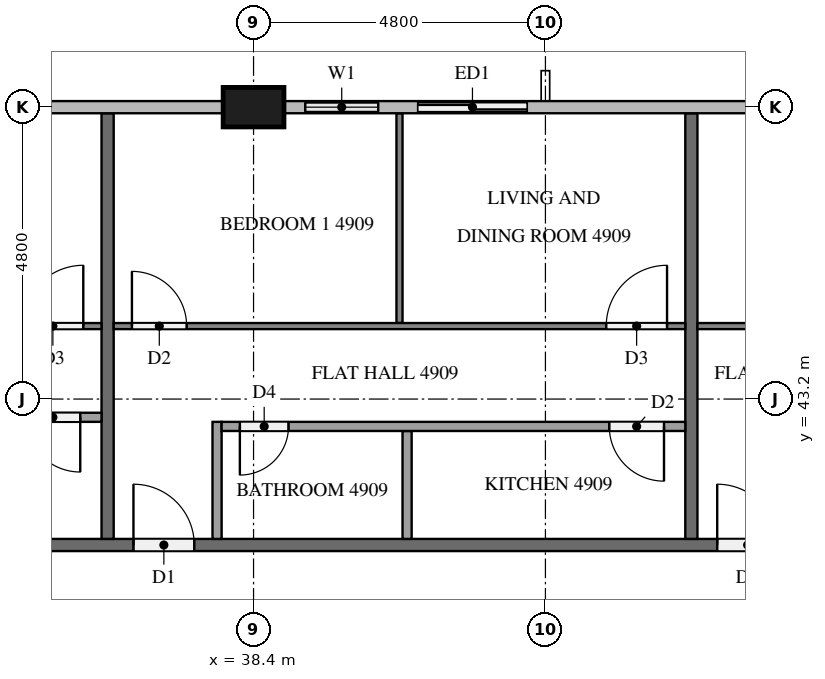
"""IFC4 building model, lengths in metres.
Left out: names, types, materials, properties, quantities, classifications, styles, units other than length and angle.
Written with IfcOpenShell. Run it as: python <this file> out.ifc"""

import sys

from ifc_helpers import new_model, si_unit, direction, frame, frame_2d, origin, origin_2d, place, context, subcontext, project, spatial, rectangle, extrude, element, fill, save


model = new_model("IFC4")
c1 = context("Model", 3, precision=1e-05, world=origin(), true_north=direction((0.0, 1.0)))
c2 = subcontext(c1, "Body", "Model", "MODEL_VIEW")
j1 = project(units=[si_unit("LENGTHUNIT", "METRE"), si_unit("PLANEANGLEUNIT", "RADIAN")], contexts=[c1])
p1 = place(None, origin())
s1 = spatial("IfcSite", under=j1, at=p1, CompositionType="ELEMENT")
p2 = place(p1, origin())
s2 = spatial("IfcBuilding", under=s1, at=p2, CompositionType="ELEMENT")
p3 = place(p2, frame((0.0, 0.0, 189.4)))
s3 = spatial("IfcBuildingStorey", under=s2, at=p3, CompositionType="ELEMENT", Elevation=189.4)
p4 = place(p3, frame((38.4, 48.0, 0.0), z_axis=(0.0, 0.0, 1.0), x_axis=(1.0, 0.0, 0.0)))
e1 = element("IfcColumn", 1, at=p4, inside=s3, PredefinedType="COLUMN", context=c2, shape_type="SweptSolid", body=[
    extrude(rectangle(XDim=1.0, YDim=0.65, at=origin_2d()), origin(), (0.0, 0.0, 1.0), 3.2),
])
p5 = place(p3, frame((43.2, 48.0, 0.0), z_axis=(0.0, 0.0, 1.0), x_axis=(-1.0, 0.0, 0.0)))
e2 = element("IfcWall", 2, at=p5, inside=s3, PredefinedType="SOLIDWALL", context=c2, shape_type="SweptSolid", body=[
    extrude(rectangle(XDim=4.3, YDim=0.15, at=frame_2d((2.15, 0.0))), origin(), (0.0, 0.0, 1.0), 3.2),
])
p6 = place(p5, frame((0.3, 0.0, 0.0)))
e3 = element("IfcOpeningElement", 3, at=p6, cuts=e2, PredefinedType="OPENING", context=c2, shape_type="SweptSolid", body=[
    extrude(rectangle(XDim=1.8, YDim=2.4, at=frame_2d((0.9, 1.2))), frame((0.0, 0.085, 0.0), z_axis=(0.0, -1.0, 0.0), x_axis=(1.0, 0.0, 0.0)), (0.0, 0.0, 1.0), 0.17),
])
p7 = place(p5, frame((2.75, 0.0, 0.9)))
e4 = element("IfcOpeningElement", 4, at=p7, cuts=e2, PredefinedType="OPENING", context=c2, shape_type="SweptSolid", body=[
    extrude(rectangle(XDim=1.2, YDim=1.4, at=frame_2d((0.6, 0.7))), frame((0.0, 0.085, 0.0), z_axis=(0.0, -1.0, 0.0), x_axis=(1.0, 0.0, 0.0)), (0.0, 0.0, 1.0), 0.17),
])
p8 = place(p3, frame((11.9, 40.8, 0.0), z_axis=(0.0, 0.0, 1.0), x_axis=(1.0, 0.0, 0.0)))
e5 = element("IfcWall", 5, at=p8, inside=s3, PredefinedType="PARTITIONING", context=c2, shape_type="SweptSolid", body=[
    extrude(rectangle(XDim=38.6, YDim=0.2, at=frame_2d((19.3, 0.0))), origin(), (0.0, 0.0, 1.0), 3.2),
])
p9 = place(p8, frame((34.125, 0.0, 0.0)))
e6 = element("IfcOpeningElement", 6, at=p9, cuts=e5, PredefinedType="OPENING", context=c2, shape_type="SweptSolid", body=[
    extrude(rectangle(XDim=1.0, YDim=2.1, at=frame_2d((0.5, 1.05))), frame((0.0, 0.11, 0.0), z_axis=(0.0, -1.0, 0.0), x_axis=(1.0, 0.0, 0.0)), (0.0, 0.0, 1.0), 0.22),
])
p10 = place(p8, frame((24.525, 0.0, 0.0)))
e7 = element("IfcOpeningElement", 7, at=p10, cuts=e5, PredefinedType="OPENING", context=c2, shape_type="SweptSolid", body=[
    extrude(rectangle(XDim=1.0, YDim=2.1, at=frame_2d((0.5, 1.05))), frame((0.0, 0.11, 0.0), z_axis=(0.0, -1.0, 0.0), x_axis=(1.0, 0.0, 0.0)), (0.0, 0.0, 1.0), 0.22),
])
p11 = place(p8, frame((7.725, 0.0, 0.0)))
e8 = element("IfcOpeningElement", 8, at=p11, cuts=e5, PredefinedType="OPENING", context=c2, shape_type="SweptSolid", body=[
    extrude(rectangle(XDim=1.0, YDim=2.1, at=frame_2d((0.5, 1.05))), frame((0.0, 0.11, 0.0), z_axis=(0.0, -1.0, 0.0), x_axis=(1.0, 0.0, 0.0)), (0.0, 0.0, 1.0), 0.22),
])
p12 = place(p8, frame((5.875, 0.0, 0.0)))
e9 = element("IfcOpeningElement", 9, at=p12, cuts=e5, PredefinedType="OPENING", context=c2, shape_type="SweptSolid", body=[
    extrude(rectangle(XDim=1.0, YDim=2.1, at=frame_2d((0.5, 1.05))), frame((0.0, 0.11, 0.0), z_axis=(0.0, -1.0, 0.0), x_axis=(1.0, 0.0, 0.0)), (0.0, 0.0, 1.0), 0.22),
])
for number, where, z_axis, x_axis in (
    (10, (45.6, 47.9, 0.0), (0.0, 0.0, 1.0), (0.0, -1.0, 0.0)),
    (11, (36.0, 47.9, 0.0), (0.0, 0.0, 1.0), (0.0, -1.0, 0.0)),
):
    element("IfcWall", number, at=place(p3, frame(where, z_axis=z_axis, x_axis=x_axis)), inside=s3, PredefinedType="PARTITIONING", context=c2, shape_type="SweptSolid", body=[
        extrude(rectangle(XDim=7.0, YDim=0.2, at=frame_2d((3.5, 0.0))), origin(), (0.0, 0.0, 1.0), 3.2),
    ])
p13 = place(p3, frame((45.7, 44.4, 0.0), z_axis=(0.0, 0.0, 1.0), x_axis=(1.0, 0.0, 0.0)))
e12 = element("IfcWall", 12, at=p13, inside=s3, PredefinedType="PARTITIONING", context=c2, shape_type="SweptSolid", body=[
    extrude(rectangle(XDim=16.279, YDim=0.1, at=frame_2d((8.139, 0.0))), origin(), (0.0, 0.0, 1.0), 3.2),
])
p14 = place(p13, frame((5.75, 0.0, 0.0)))
e13 = element("IfcOpeningElement", 13, at=p14, cuts=e12, PredefinedType="OPENING", context=c2, shape_type="SweptSolid", body=[
    extrude(rectangle(XDim=1.0, YDim=2.1, at=frame_2d((0.5, 1.05))), frame((0.0, 0.06, 0.0), z_axis=(0.0, -1.0, 0.0), x_axis=(1.0, 0.0, 0.0)), (0.0, 0.0, 1.0), 0.12),
])
p15 = place(p13, frame((7.45, 0.0, 0.0)))
e14 = element("IfcOpeningElement", 14, at=p15, cuts=e12, PredefinedType="OPENING", context=c2, shape_type="SweptSolid", body=[
    extrude(rectangle(XDim=0.9, YDim=2.1, at=frame_2d((0.45, 1.05))), frame((0.0, 0.06, 0.0), z_axis=(0.0, -1.0, 0.0), x_axis=(1.0, 0.0, 0.0)), (0.0, 0.0, 1.0), 0.12),
])
p16 = place(p13, frame((15.079, 0.0, 0.0)))
e15 = element("IfcOpeningElement", 15, at=p16, cuts=e12, PredefinedType="OPENING", context=c2, shape_type="SweptSolid", body=[
    extrude(rectangle(XDim=0.9, YDim=2.1, at=frame_2d((0.45, 1.05))), frame((0.0, 0.06, 0.0), z_axis=(0.0, -1.0, 0.0), x_axis=(1.0, 0.0, 0.0)), (0.0, 0.0, 1.0), 0.12),
])
p17 = place(p3, frame((40.8, 44.45, 0.0), z_axis=(0.0, 0.0, 1.0), x_axis=(0.0, 1.0, 0.0)))
e16 = element("IfcWall", 16, at=p17, inside=s3, PredefinedType="PARTITIONING", context=c2, shape_type="SweptSolid", body=[
    extrude(rectangle(XDim=3.45, YDim=0.1, at=frame_2d((1.725, 0.0))), origin(), (0.0, 0.0, 1.0), 3.2),
])
p18 = place(p3, frame((36.1, 44.4, 0.0), z_axis=(0.0, 0.0, 1.0), x_axis=(1.0, 0.0, 0.0)))
e17 = element("IfcWall", 17, at=p18, inside=s3, PredefinedType="PARTITIONING", context=c2, shape_type="SweptSolid", body=[
    extrude(rectangle(XDim=9.4, YDim=0.1, at=frame_2d((4.7, 0.0))), origin(), (0.0, 0.0, 1.0), 3.2),
])
p19 = place(p18, frame((0.3, 0.0, 0.0)))
e18 = element("IfcOpeningElement", 18, at=p19, cuts=e17, PredefinedType="OPENING", context=c2, shape_type="SweptSolid", body=[
    extrude(rectangle(XDim=0.9, YDim=2.1, at=frame_2d((0.45, 1.05))), frame((0.0, 0.06, 0.0), z_axis=(0.0, -1.0, 0.0), x_axis=(1.0, 0.0, 0.0)), (0.0, 0.0, 1.0), 0.12),
])
p20 = place(p18, frame((8.1, 0.0, 0.0)))
e19 = element("IfcOpeningElement", 19, at=p20, cuts=e17, PredefinedType="OPENING", context=c2, shape_type="SweptSolid", body=[
    extrude(rectangle(XDim=1.0, YDim=2.1, at=frame_2d((0.5, 1.05))), frame((0.0, 0.06, 0.0), z_axis=(0.0, -1.0, 0.0), x_axis=(1.0, 0.0, 0.0)), (0.0, 0.0, 1.0), 0.12),
])
p21 = place(p3, frame((40.925, 40.9, 0.0), z_axis=(0.0, 0.0, 1.0), x_axis=(0.0, 1.0, 0.0)))
e20 = element("IfcWall", 20, at=p21, inside=s3, PredefinedType="PARTITIONING", context=c2, shape_type="SweptSolid", body=[
    extrude(rectangle(XDim=1.775, YDim=0.15, at=frame_2d((0.888, 0.0))), origin(), (0.0, 0.0, 1.0), 3.2),
])
p22 = place(p3, frame((37.8, 40.9, 0.0), z_axis=(0.0, 0.0, 1.0), x_axis=(0.0, 1.0, 0.0)))
e21 = element("IfcWall", 21, at=p22, inside=s3, PredefinedType="PARTITIONING", context=c2, shape_type="SweptSolid", body=[
    extrude(rectangle(XDim=1.925, YDim=0.15, at=frame_2d((0.962, 0.0))), origin(), (0.0, 0.0, 1.0), 3.2),
])
p23 = place(p3, frame((45.5, 42.75, 0.0), z_axis=(0.0, 0.0, 1.0), x_axis=(-1.0, 0.0, 0.0)))
e22 = element("IfcWall", 22, at=p23, inside=s3, PredefinedType="PARTITIONING", context=c2, shape_type="SweptSolid", body=[
    extrude(rectangle(XDim=7.625, YDim=0.15, at=frame_2d((3.812, 0.0))), origin(), (0.0, 0.0, 1.0), 3.2),
])
p24 = place(p23, frame((6.525, 0.0, 0.0)))
e23 = element("IfcOpeningElement", 23, at=p24, cuts=e22, PredefinedType="OPENING", context=c2, shape_type="SweptSolid", body=[
    extrude(rectangle(XDim=0.8, YDim=2.1, at=frame_2d((0.4, 1.05))), frame((0.0, 0.085, 0.0), z_axis=(0.0, -1.0, 0.0), x_axis=(1.0, 0.0, 0.0)), (0.0, 0.0, 1.0), 0.17),
])
p25 = place(p23, frame((0.35, 0.0, 0.0)))
e24 = element("IfcOpeningElement", 24, at=p25, cuts=e22, PredefinedType="OPENING", context=c2, shape_type="SweptSolid", body=[
    extrude(rectangle(XDim=0.9, YDim=2.1, at=frame_2d((0.45, 1.05))), frame((0.0, 0.085, 0.0), z_axis=(0.0, -1.0, 0.0), x_axis=(1.0, 0.0, 0.0)), (0.0, 0.0, 1.0), 0.17),
])
p26 = place(p3, frame((19.3, 44.4, 0.0), z_axis=(0.0, 0.0, 1.0), x_axis=(1.0, 0.0, 0.0)))
e25 = element("IfcWall", 25, at=p26, inside=s3, PredefinedType="PARTITIONING", context=c2, shape_type="SweptSolid", body=[
    extrude(rectangle(XDim=16.6, YDim=0.1, at=frame_2d((8.3, 0.0))), origin(), (0.0, 0.0, 1.0), 3.2),
])
p27 = place(p26, frame((3.45, 0.0, 0.0)))
e26 = element("IfcOpeningElement", 26, at=p27, cuts=e25, PredefinedType="OPENING", context=c2, shape_type="SweptSolid", body=[
    extrude(rectangle(XDim=0.9, YDim=2.1, at=frame_2d((0.45, 1.05))), frame((0.0, 0.06, 0.0), z_axis=(0.0, -1.0, 0.0), x_axis=(1.0, 0.0, 0.0)), (0.0, 0.0, 1.0), 0.12),
])
p28 = place(p26, frame((5.05, 0.0, 0.0)))
e27 = element("IfcOpeningElement", 27, at=p28, cuts=e25, PredefinedType="OPENING", context=c2, shape_type="SweptSolid", body=[
    extrude(rectangle(XDim=0.9, YDim=2.1, at=frame_2d((0.45, 1.05))), frame((0.0, 0.06, 0.0), z_axis=(0.0, -1.0, 0.0), x_axis=(1.0, 0.0, 0.0)), (0.0, 0.0, 1.0), 0.12),
])
p29 = place(p26, frame((15.3, 0.0, 0.0)))
e28 = element("IfcOpeningElement", 28, at=p29, cuts=e25, PredefinedType="OPENING", context=c2, shape_type="SweptSolid", body=[
    extrude(rectangle(XDim=1.0, YDim=2.1, at=frame_2d((0.5, 1.05))), frame((0.0, 0.06, 0.0), z_axis=(0.0, -1.0, 0.0), x_axis=(1.0, 0.0, 0.0)), (0.0, 0.0, 1.0), 0.12),
])
p30 = place(p3, frame((35.9, 42.9, 0.0), z_axis=(0.0, 0.0, 1.0), x_axis=(-1.0, 0.0, 0.0)))
e29 = element("IfcWall", 29, at=p30, inside=s3, PredefinedType="PARTITIONING", context=c2, shape_type="SweptSolid", body=[
    extrude(rectangle(XDim=14.825, YDim=0.15, at=frame_2d((7.413, 0.0))), origin(), (0.0, 0.0, 1.0), 3.2),
])
p31 = place(p30, frame((8.308, 0.0, 0.0)))
e30 = element("IfcOpeningElement", 30, at=p31, cuts=e29, PredefinedType="OPENING", context=c2, shape_type="SweptSolid", body=[
    extrude(rectangle(XDim=0.9, YDim=2.1, at=frame_2d((0.45, 1.05))), frame((0.0, 0.085, 0.0), z_axis=(0.0, -1.0, 0.0), x_axis=(1.0, 0.0, 0.0)), (0.0, 0.0, 1.0), 0.17),
])
p32 = place(p30, frame((6.858, 0.0, 0.0)))
e31 = element("IfcOpeningElement", 31, at=p32, cuts=e29, PredefinedType="OPENING", context=c2, shape_type="SweptSolid", body=[
    extrude(rectangle(XDim=0.8, YDim=2.1, at=frame_2d((0.4, 1.05))), frame((0.0, 0.085, 0.0), z_axis=(0.0, -1.0, 0.0), x_axis=(1.0, 0.0, 0.0)), (0.0, 0.0, 1.0), 0.17),
])
p33 = place(p30, frame((0.35, 0.0, 0.0)))
e32 = element("IfcOpeningElement", 32, at=p33, cuts=e29, PredefinedType="OPENING", context=c2, shape_type="SweptSolid", body=[
    extrude(rectangle(XDim=0.9, YDim=2.1, at=frame_2d((0.45, 1.05))), frame((0.0, 0.085, 0.0), z_axis=(0.0, -1.0, 0.0), x_axis=(1.0, 0.0, 0.0)), (0.0, 0.0, 1.0), 0.17),
])
p34 = place(p6, origin())
e33 = element("IfcDoor", 33, at=p34, inside=s3, OperationType="SLIDING_TO_RIGHT", PredefinedType="DOOR", context=c2, shape_type="SweptSolid", body=[
    extrude(rectangle(XDim=1.8, YDim=2.4, at=frame_2d((0.9, 1.2))), frame((0.0, 0.025, 0.0), z_axis=(0.0, -1.0, 0.0), x_axis=(1.0, 0.0, 0.0)), (0.0, 0.0, 1.0), 0.05),
])
fill(e3, e33)
p35 = place(p7, origin())
e34 = element("IfcWindow", 34, at=p35, inside=s3, PartitioningType="SINGLE_PANEL", PredefinedType="WINDOW", context=c2, shape_type="SweptSolid", body=[
    extrude(rectangle(XDim=1.2, YDim=1.4, at=frame_2d((0.6, 0.7))), frame((0.0, 0.03, 0.0), z_axis=(0.0, -1.0, 0.0), x_axis=(1.0, 0.0, 0.0)), (0.0, 0.0, 1.0), 0.06),
])
fill(e4, e34)
p36 = place(p9, origin())
e35 = element("IfcDoor", 35, at=p36, inside=s3, OperationType="SINGLE_SWING_LEFT", PredefinedType="DOOR", context=c2, shape_type="SweptSolid", body=[
    extrude(rectangle(XDim=1.0, YDim=2.1, at=frame_2d((0.5, 1.05))), frame((0.0, 0.025, 0.0), z_axis=(0.0, -1.0, 0.0), x_axis=(1.0, 0.0, 0.0)), (0.0, 0.0, 1.0), 0.05),
])
fill(e6, e35)
p37 = place(p10, origin())
e36 = element("IfcDoor", 36, at=p37, inside=s3, OperationType="SINGLE_SWING_LEFT", PredefinedType="DOOR", context=c2, shape_type="SweptSolid", body=[
    extrude(rectangle(XDim=1.0, YDim=2.1, at=frame_2d((0.5, 1.05))), frame((0.0, 0.025, 0.0), z_axis=(0.0, -1.0, 0.0), x_axis=(1.0, 0.0, 0.0)), (0.0, 0.0, 1.0), 0.05),
])
fill(e7, e36)
p38 = place(p19, origin())
e37 = element("IfcDoor", 37, at=p38, inside=s3, OperationType="SINGLE_SWING_LEFT", PredefinedType="DOOR", context=c2, shape_type="SweptSolid", body=[
    extrude(rectangle(XDim=0.9, YDim=2.1, at=frame_2d((0.45, 1.05))), frame((0.0, 0.025, 0.0), z_axis=(0.0, -1.0, 0.0), x_axis=(1.0, 0.0, 0.0)), (0.0, 0.0, 1.0), 0.05),
])
fill(e18, e37)
p39 = place(p20, origin())
e38 = element("IfcDoor", 38, at=p39, inside=s3, OperationType="SINGLE_SWING_RIGHT", PredefinedType="DOOR", context=c2, shape_type="SweptSolid", body=[
    extrude(rectangle(XDim=1.0, YDim=2.1, at=frame_2d((0.5, 1.05))), frame((0.0, 0.025, 0.0), z_axis=(0.0, -1.0, 0.0), x_axis=(1.0, 0.0, 0.0)), (0.0, 0.0, 1.0), 0.05),
])
fill(e19, e38)
p40 = place(p24, origin())
e39 = element("IfcDoor", 39, at=p40, inside=s3, OperationType="SINGLE_SWING_RIGHT", PredefinedType="DOOR", context=c2, shape_type="SweptSolid", body=[
    extrude(rectangle(XDim=0.8, YDim=2.1, at=frame_2d((0.4, 1.05))), frame((0.0, 0.025, 0.0), z_axis=(0.0, -1.0, 0.0), x_axis=(1.0, 0.0, 0.0)), (0.0, 0.0, 1.0), 0.05),
])
fill(e23, e39)
p41 = place(p25, origin())
e40 = element("IfcDoor", 40, at=p41, inside=s3, OperationType="SINGLE_SWING_LEFT", PredefinedType="DOOR", context=c2, shape_type="SweptSolid", body=[
    extrude(rectangle(XDim=0.9, YDim=2.1, at=frame_2d((0.45, 1.05))), frame((0.0, 0.025, 0.0), z_axis=(0.0, -1.0, 0.0), x_axis=(1.0, 0.0, 0.0)), (0.0, 0.0, 1.0), 0.05),
])
fill(e24, e40)
p42 = place(p29, origin())
e41 = element("IfcDoor", 41, at=p42, inside=s3, OperationType="SINGLE_SWING_RIGHT", PredefinedType="DOOR", context=c2, shape_type="SweptSolid", body=[
    extrude(rectangle(XDim=1.0, YDim=2.1, at=frame_2d((0.5, 1.05))), frame((0.0, 0.025, 0.0), z_axis=(0.0, -1.0, 0.0), x_axis=(1.0, 0.0, 0.0)), (0.0, 0.0, 1.0), 0.05),
])
fill(e28, e41)
p43 = place(p33, origin())
e42 = element("IfcDoor", 42, at=p43, inside=s3, OperationType="SINGLE_SWING_LEFT", PredefinedType="DOOR", context=c2, shape_type="SweptSolid", body=[
    extrude(rectangle(XDim=0.9, YDim=2.1, at=frame_2d((0.45, 1.05))), frame((0.0, 0.025, 0.0), z_axis=(0.0, -1.0, 0.0), x_axis=(1.0, 0.0, 0.0)), (0.0, 0.0, 1.0), 0.05),
])
fill(e32, e42)
save(model, sys.argv[1])
